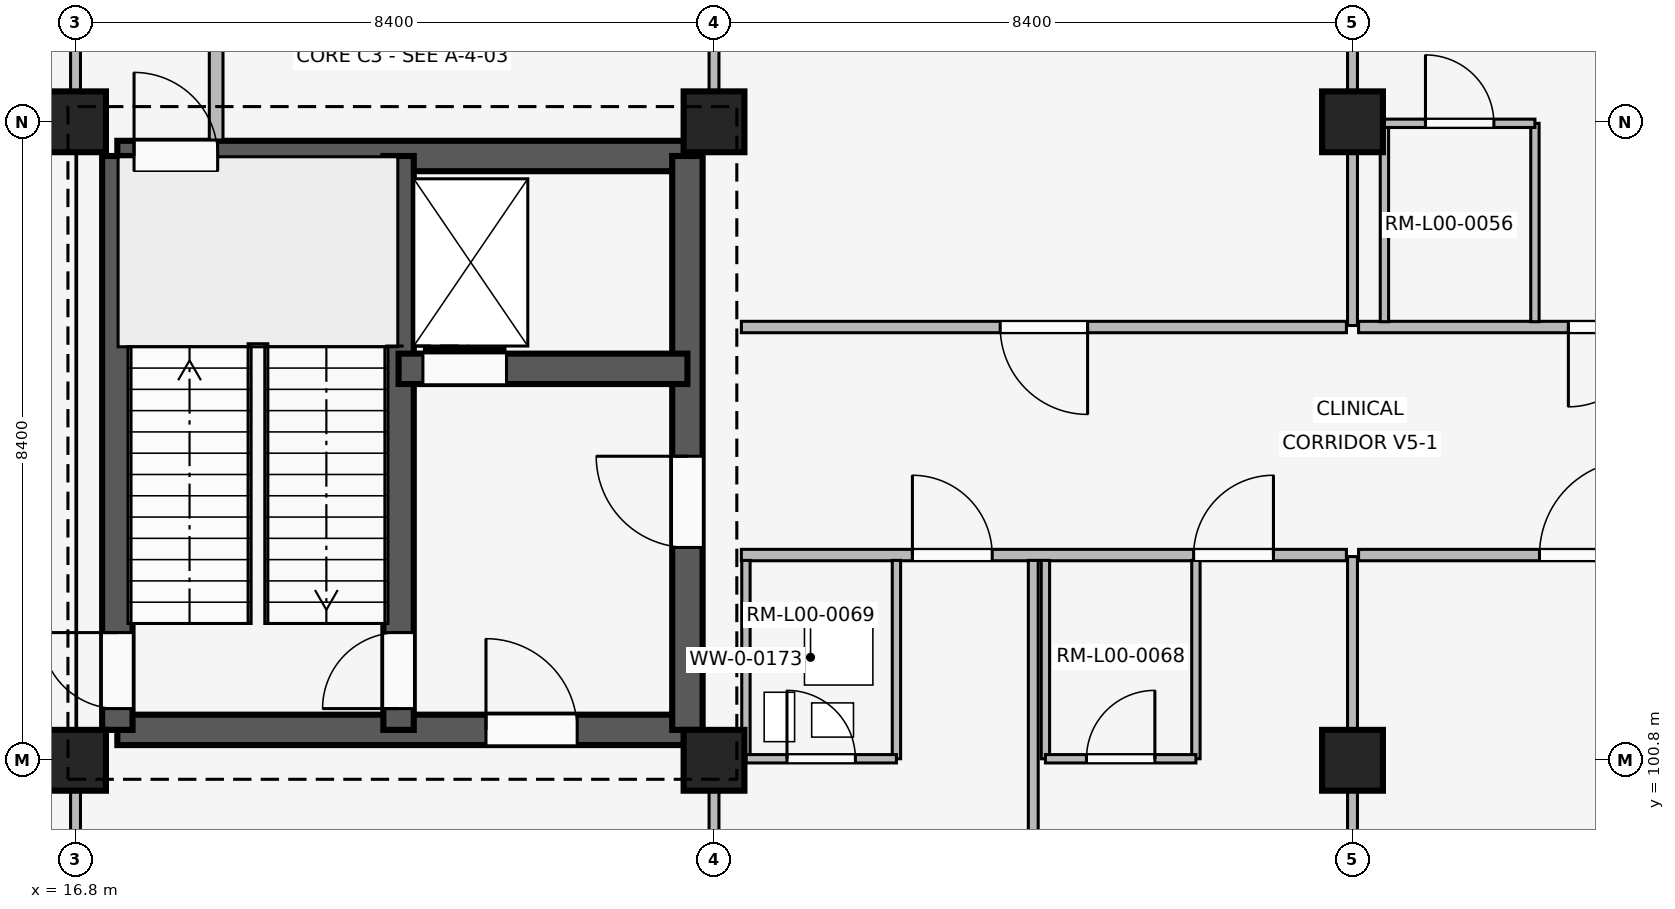
"""IFC4 building model, lengths in metres.
Left out: names, types, materials, properties, quantities, classifications, styles, units other than length and angle.
Written with IfcOpenShell. Run it as: python <this file> out.ifc"""

import sys

from ifc_helpers import new_model, si_unit, direction, frame, frame_2d, origin, origin_2d, place, context, subcontext, project, spatial, rectangle, extrude, element, fill, save


model = new_model("IFC4")
c1 = context("Model", 3, precision=1e-05, world=origin(), true_north=direction((0.0, 1.0)))
c2 = subcontext(c1, "Body", "Model", "MODEL_VIEW")
j1 = project(units=[si_unit("LENGTHUNIT", "METRE"), si_unit("PLANEANGLEUNIT", "RADIAN")], contexts=[c1])
p1 = place(None, origin())
s1 = spatial("IfcSite", under=j1, at=p1, CompositionType="ELEMENT")
p2 = place(p1, origin())
s2 = spatial("IfcBuilding", under=s1, at=p2, CompositionType="ELEMENT")
p3 = place(p2, origin())
s3 = spatial("IfcBuildingStorey", under=s2, at=p3, CompositionType="ELEMENT", Elevation=0.0)
for number, where, z_axis, x_axis in (
    (1, (16.8, 100.8, 0.0), (0.0, 0.0, 1.0), (1.0, 0.0, 0.0)),
    (2, (16.8, 109.2, 0.0), (0.0, 0.0, 1.0), (1.0, 0.0, 0.0)),
    (3, (25.2, 100.8, 0.0), (0.0, 0.0, 1.0), (1.0, 0.0, 0.0)),
    (4, (25.2, 109.2, 0.0), (0.0, 0.0, 1.0), (1.0, 0.0, 0.0)),
    (5, (33.6, 100.8, 0.0), (0.0, 0.0, 1.0), (1.0, 0.0, 0.0)),
    (6, (33.6, 109.2, 0.0), (0.0, 0.0, 1.0), (1.0, 0.0, 0.0)),
):
    element("IfcColumn", number, at=place(p3, frame(where, z_axis=z_axis, x_axis=x_axis)), inside=s3, PredefinedType="COLUMN", context=c2, shape_type="SweptSolid", body=[
        extrude(rectangle(XDim=0.8, YDim=0.8, at=origin_2d()), origin(), (0.0, 0.0, 1.0), 4.8),
    ])
p4 = place(p3, frame((17.35, 101.2, 0.0), z_axis=(0.0, 0.0, 1.0), x_axis=(1.0, 0.0, 0.0)))
e7 = element("IfcWall", 7, at=p4, inside=s3, PredefinedType="SHEAR", context=c2, shape_type="SweptSolid", body=[
    extrude(rectangle(XDim=7.5, YDim=0.4, at=frame_2d((3.75, 0.0))), origin(), (0.0, 0.0, 1.0), 4.52),
])
p5 = place(p4, frame((4.85, 0.0, 0.0)))
e8 = element("IfcOpeningElement", 8, at=p5, cuts=e7, PredefinedType="OPENING", context=c2, shape_type="SweptSolid", body=[
    extrude(rectangle(XDim=1.2, YDim=2.2, at=frame_2d((0.6, 1.1))), frame((0.0, 0.21, 0.0), z_axis=(0.0, -1.0, 0.0), x_axis=(1.0, 0.0, 0.0)), (0.0, 0.0, 1.0), 0.42),
])
p6 = place(p3, frame((17.35, 108.75, 0.0), z_axis=(0.0, 0.0, 1.0), x_axis=(1.0, 0.0, 0.0)))
e9 = element("IfcWall", 9, at=p6, inside=s3, PredefinedType="SHEAR", context=c2, shape_type="SweptSolid", body=[
    extrude(rectangle(XDim=7.5, YDim=0.4, at=frame_2d((3.75, 0.0))), origin(), (0.0, 0.0, 1.0), 4.52),
])
p7 = place(p6, frame((0.22, 0.0, 0.0)))
e10 = element("IfcOpeningElement", 10, at=p7, cuts=e9, PredefinedType="OPENING", context=c2, shape_type="SweptSolid", body=[
    extrude(rectangle(XDim=1.1, YDim=2.1, at=frame_2d((0.55, 1.05))), frame((0.0, 0.21, 0.0), z_axis=(0.0, -1.0, 0.0), x_axis=(1.0, 0.0, 0.0)), (0.0, 0.0, 1.0), 0.42),
])
p8 = place(p3, frame((17.35, 101.2, 0.0), z_axis=(0.0, 0.0, 1.0), x_axis=(0.0, 1.0, 0.0)))
e11 = element("IfcWall", 11, at=p8, inside=s3, PredefinedType="SHEAR", context=c2, shape_type="SweptSolid", body=[
    extrude(rectangle(XDim=7.55, YDim=0.4, at=frame_2d((3.775, 0.0))), origin(), (0.0, 0.0, 1.0), 4.52),
])
p9 = place(p8, frame((0.28, 0.0, 0.0)))
e12 = element("IfcOpeningElement", 12, at=p9, cuts=e11, PredefinedType="OPENING", context=c2, shape_type="SweptSolid", body=[
    extrude(rectangle(XDim=1.0, YDim=2.15, at=frame_2d((0.5, 1.075))), frame((0.0, 0.21, 0.0), z_axis=(0.0, -1.0, 0.0), x_axis=(1.0, 0.0, 0.0)), (0.0, 0.0, 1.0), 0.42),
])
p10 = place(p3, frame((24.85, 101.2, 0.0), z_axis=(0.0, 0.0, 1.0), x_axis=(0.0, 1.0, 0.0)))
e13 = element("IfcWall", 13, at=p10, inside=s3, PredefinedType="SHEAR", context=c2, shape_type="SweptSolid", body=[
    extrude(rectangle(XDim=7.55, YDim=0.4, at=frame_2d((3.775, 0.0))), origin(), (0.0, 0.0, 1.0), 4.52),
])
p11 = place(p10, frame((2.4, 0.0, 0.0)))
e14 = element("IfcOpeningElement", 14, at=p11, cuts=e13, PredefinedType="OPENING", context=c2, shape_type="SweptSolid", body=[
    extrude(rectangle(XDim=1.2, YDim=2.2, at=frame_2d((0.6, 1.1))), frame((0.0, 0.21, 0.0), z_axis=(0.0, -1.0, 0.0), x_axis=(1.0, 0.0, 0.0)), (0.0, 0.0, 1.0), 0.42),
])
p12 = place(p3, frame((21.05, 101.2, 0.0), z_axis=(0.0, 0.0, 1.0), x_axis=(0.0, 1.0, 0.0)))
e15 = element("IfcWall", 15, at=p12, inside=s3, PredefinedType="SHEAR", context=c2, shape_type="SweptSolid", body=[
    extrude(rectangle(XDim=7.55, YDim=0.4, at=frame_2d((3.775, 0.0))), origin(), (0.0, 0.0, 1.0), 4.52),
])
p13 = place(p12, frame((0.28, 0.0, 0.0)))
e16 = element("IfcOpeningElement", 16, at=p13, cuts=e15, PredefinedType="OPENING", context=c2, shape_type="SweptSolid", body=[
    extrude(rectangle(XDim=1.0, YDim=2.15, at=frame_2d((0.5, 1.075))), frame((0.0, 0.21, 0.0), z_axis=(0.0, -1.0, 0.0), x_axis=(1.0, 0.0, 0.0)), (0.0, 0.0, 1.0), 0.42),
])
p14 = place(p3, frame((21.05, 105.95, 0.0), z_axis=(0.0, 0.0, 1.0), x_axis=(1.0, 0.0, 0.0)))
e17 = element("IfcWall", 17, at=p14, inside=s3, PredefinedType="SHEAR", context=c2, shape_type="SweptSolid", body=[
    extrude(rectangle(XDim=3.8, YDim=0.4, at=frame_2d((1.9, 0.0))), origin(), (0.0, 0.0, 1.0), 4.52),
])
p15 = place(p14, frame((0.32, 0.0, 0.0)))
e18 = element("IfcOpeningElement", 18, at=p15, cuts=e17, PredefinedType="OPENING", context=c2, shape_type="SweptSolid", body=[
    extrude(rectangle(XDim=1.1, YDim=2.15, at=frame_2d((0.55, 1.075))), frame((0.0, 0.21, 0.0), z_axis=(0.0, -1.0, 0.0), x_axis=(1.0, 0.0, 0.0)), (0.0, 0.0, 1.0), 0.42),
])
p16 = place(p3, frame((16.8, 92.54, 0.0), z_axis=(0.0, 0.0, 1.0), x_axis=(0.0, 1.0, 0.0)))
e19 = element("IfcWall", 19, at=p16, inside=s3, PredefinedType="PARTITIONING", context=c2, shape_type="SweptSolid", body=[
    extrude(rectangle(XDim=8.21, YDim=0.13, at=frame_2d((4.105, 0.0))), origin(), (0.0, 0.0, 1.0), 3.8),
])
p17 = place(p3, frame((16.8, 109.55, 0.0), z_axis=(0.0, 0.0, 1.0), x_axis=(0.0, 1.0, 0.0)))
e20 = element("IfcWall", 20, at=p17, inside=s3, PredefinedType="PARTITIONING", context=c2, shape_type="SweptSolid", body=[
    extrude(rectangle(XDim=7.91, YDim=0.13, at=frame_2d((3.955, 0.0))), origin(), (0.0, 0.0, 1.0), 3.8),
])
p18 = place(p3, frame((18.65, 108.96, 0.0), z_axis=(0.0, 0.0, 1.0), x_axis=(0.0, 1.0, 0.0)))
e21 = element("IfcWall", 21, at=p18, inside=s3, PredefinedType="PARTITIONING", context=c2, shape_type="SweptSolid", body=[
    extrude(rectangle(XDim=8.5, YDim=0.18, at=frame_2d((4.25, 0.0))), origin(), (0.0, 0.0, 1.0), 3.8),
])
p19 = place(p3, frame((25.2, 92.54, 0.0), z_axis=(0.0, 0.0, 1.0), x_axis=(0.0, 1.0, 0.0)))
e22 = element("IfcWall", 22, at=p19, inside=s3, PredefinedType="PARTITIONING", context=c2, shape_type="SweptSolid", body=[
    extrude(rectangle(XDim=8.21, YDim=0.13, at=frame_2d((4.105, 0.0))), origin(), (0.0, 0.0, 1.0), 3.8),
])
p20 = place(p19, frame((3.64, 0.0, 0.0)))
e23 = element("IfcOpeningElement", 23, at=p20, cuts=e22, PredefinedType="OPENING", context=c2, shape_type="SweptSolid", body=[
    extrude(rectangle(XDim=1.08, YDim=2.15, at=frame_2d((0.54, 1.075))), frame((0.0, 0.075, 0.0), z_axis=(0.0, -1.0, 0.0), x_axis=(1.0, 0.0, 0.0)), (0.0, 0.0, 1.0), 0.15),
])
p21 = place(p3, frame((25.2, 109.55, 0.0), z_axis=(0.0, 0.0, 1.0), x_axis=(0.0, 1.0, 0.0)))
e24 = element("IfcWall", 24, at=p21, inside=s3, PredefinedType="PARTITIONING", context=c2, shape_type="SweptSolid", body=[
    extrude(rectangle(XDim=7.91, YDim=0.13, at=frame_2d((3.955, 0.0))), origin(), (0.0, 0.0, 1.0), 3.8),
])
p22 = place(p21, frame((3.4, 0.0, 0.0)))
e25 = element("IfcOpeningElement", 25, at=p22, cuts=e24, PredefinedType="OPENING", context=c2, shape_type="SweptSolid", body=[
    extrude(rectangle(XDim=1.05, YDim=2.2, at=frame_2d((0.525, 1.1))), frame((0.0, 0.075, 0.0), z_axis=(0.0, -1.0, 0.0), x_axis=(1.0, 0.0, 0.0)), (0.0, 0.0, 1.0), 0.15),
])
p23 = place(p3, frame((25.56, 103.5, 0.0), z_axis=(0.0, 0.0, 1.0), x_axis=(1.0, 0.0, 0.0)))
e26 = element("IfcWall", 26, at=p23, inside=s3, PredefinedType="PARTITIONING", context=c2, shape_type="SweptSolid", body=[
    extrude(rectangle(XDim=7.96, YDim=0.15, at=frame_2d((3.98, 0.0))), origin(), (0.0, 0.0, 1.0), 3.8),
])
p24 = place(p23, frame((2.25, 0.0, 0.0)))
e27 = element("IfcOpeningElement", 27, at=p24, cuts=e26, PredefinedType="OPENING", context=c2, shape_type="SweptSolid", body=[
    extrude(rectangle(XDim=1.05, YDim=2.2, at=frame_2d((0.525, 1.1))), frame((0.0, 0.085, 0.0), z_axis=(0.0, -1.0, 0.0), x_axis=(1.0, 0.0, 0.0)), (0.0, 0.0, 1.0), 0.17),
])
p25 = place(p23, frame((5.95, 0.0, 0.0)))
e28 = element("IfcOpeningElement", 28, at=p25, cuts=e26, PredefinedType="OPENING", context=c2, shape_type="SweptSolid", body=[
    extrude(rectangle(XDim=1.05, YDim=2.2, at=frame_2d((0.525, 1.1))), frame((0.0, 0.085, 0.0), z_axis=(0.0, -1.0, 0.0), x_axis=(1.0, 0.0, 0.0)), (0.0, 0.0, 1.0), 0.17),
])
p26 = place(p3, frame((29.4, 92.5, 0.0), z_axis=(0.0, 0.0, 1.0), x_axis=(0.0, 1.0, 0.0)))
e29 = element("IfcWall", 29, at=p26, inside=s3, PredefinedType="PARTITIONING", context=c2, shape_type="SweptSolid", body=[
    extrude(rectangle(XDim=10.93, YDim=0.13, at=frame_2d((5.465, 0.0))), origin(), (0.0, 0.0, 1.0), 3.8),
])
for number, where, z_axis, x_axis in (
    (30, (25.62, 100.82, 0.0), (0.0, 0.0, 1.0), (0.0, 1.0, 0.0)),
    (31, (27.6, 100.82, 0.0), (0.0, 0.0, 1.0), (0.0, 1.0, 0.0)),
):
    element("IfcWall", number, at=place(p3, frame(where, z_axis=z_axis, x_axis=x_axis)), inside=s3, PredefinedType="PARTITIONING", context=c2, shape_type="SweptSolid", body=[
        extrude(rectangle(XDim=2.61, YDim=0.11, at=frame_2d((1.305, 0.0))), origin(), (0.0, 0.0, 1.0), 3.8),
    ])
p27 = place(p3, frame((25.62, 100.82, 0.0), z_axis=(0.0, 0.0, 1.0), x_axis=(1.0, 0.0, 0.0)))
e32 = element("IfcWall", 32, at=p27, inside=s3, PredefinedType="PARTITIONING", context=c2, shape_type="SweptSolid", body=[
    extrude(rectangle(XDim=1.98, YDim=0.11, at=frame_2d((0.99, 0.0))), origin(), (0.0, 0.0, 1.0), 3.8),
])
p28 = place(p27, frame((0.54, 0.0, 0.0)))
e33 = element("IfcOpeningElement", 33, at=p28, cuts=e32, PredefinedType="OPENING", context=c2, shape_type="SweptSolid", body=[
    extrude(rectangle(XDim=0.9, YDim=2.1, at=frame_2d((0.45, 1.05))), frame((0.0, 0.065, 0.0), z_axis=(0.0, -1.0, 0.0), x_axis=(1.0, 0.0, 0.0)), (0.0, 0.0, 1.0), 0.13),
])
for number, where, z_axis, x_axis in (
    (34, (29.56, 100.82, 0.0), (0.0, 0.0, 1.0), (0.0, 1.0, 0.0)),
    (35, (31.54, 100.82, 0.0), (0.0, 0.0, 1.0), (0.0, 1.0, 0.0)),
):
    element("IfcWall", number, at=place(p3, frame(where, z_axis=z_axis, x_axis=x_axis)), inside=s3, PredefinedType="PARTITIONING", context=c2, shape_type="SweptSolid", body=[
        extrude(rectangle(XDim=2.61, YDim=0.11, at=frame_2d((1.305, 0.0))), origin(), (0.0, 0.0, 1.0), 3.8),
    ])
p29 = place(p3, frame((29.56, 100.82, 0.0), z_axis=(0.0, 0.0, 1.0), x_axis=(1.0, 0.0, 0.0)))
e36 = element("IfcWall", 36, at=p29, inside=s3, PredefinedType="PARTITIONING", context=c2, shape_type="SweptSolid", body=[
    extrude(rectangle(XDim=1.98, YDim=0.11, at=frame_2d((0.99, 0.0))), origin(), (0.0, 0.0, 1.0), 3.8),
])
p30 = place(p29, frame((0.54, 0.0, 0.0)))
e37 = element("IfcOpeningElement", 37, at=p30, cuts=e36, PredefinedType="OPENING", context=c2, shape_type="SweptSolid", body=[
    extrude(rectangle(XDim=0.9, YDim=2.1, at=frame_2d((0.45, 1.05))), frame((0.0, 0.065, 0.0), z_axis=(0.0, -1.0, 0.0), x_axis=(1.0, 0.0, 0.0)), (0.0, 0.0, 1.0), 0.13),
])
p31 = place(p3, frame((33.52, 106.5, 0.0), z_axis=(0.0, 0.0, 1.0), x_axis=(-1.0, 0.0, 0.0)))
e38 = element("IfcWall", 38, at=p31, inside=s3, PredefinedType="PARTITIONING", context=c2, shape_type="SweptSolid", body=[
    extrude(rectangle(XDim=7.96, YDim=0.15, at=frame_2d((3.98, 0.0))), origin(), (0.0, 0.0, 1.0), 3.8),
])
p32 = place(p31, frame((3.405, 0.0, 0.0)))
e39 = element("IfcOpeningElement", 39, at=p32, cuts=e38, PredefinedType="OPENING", context=c2, shape_type="SweptSolid", body=[
    extrude(rectangle(XDim=1.15, YDim=2.2, at=frame_2d((0.575, 1.1))), frame((0.0, 0.085, 0.0), z_axis=(0.0, -1.0, 0.0), x_axis=(1.0, 0.0, 0.0)), (0.0, 0.0, 1.0), 0.17),
])
for number, where, z_axis, x_axis in (
    (40, (33.6, 92.54, 0.0), (0.0, 0.0, 1.0), (0.0, 1.0, 0.0)),
    (41, (33.6, 106.52, 0.0), (0.0, 0.0, 1.0), (0.0, 1.0, 0.0)),
):
    element("IfcWall", number, at=place(p3, frame(where, z_axis=z_axis, x_axis=x_axis)), inside=s3, PredefinedType="PARTITIONING", context=c2, shape_type="SweptSolid", body=[
        extrude(rectangle(XDim=10.94, YDim=0.13, at=frame_2d((5.47, 0.0))), origin(), (0.0, 0.0, 1.0), 3.8),
    ])
p33 = place(p3, frame((33.68, 103.5, 0.0), z_axis=(0.0, 0.0, 1.0), x_axis=(1.0, 0.0, 0.0)))
e42 = element("IfcWall", 42, at=p33, inside=s3, PredefinedType="PARTITIONING", context=c2, shape_type="SweptSolid", body=[
    extrude(rectangle(XDim=5.78, YDim=0.15, at=frame_2d((2.89, 0.0))), origin(), (0.0, 0.0, 1.0), 3.8),
])
p34 = place(p33, frame((2.38, 0.0, 0.0)))
e43 = element("IfcOpeningElement", 43, at=p34, cuts=e42, PredefinedType="OPENING", context=c2, shape_type="SweptSolid", body=[
    extrude(rectangle(XDim=1.25, YDim=2.2, at=frame_2d((0.625, 1.1))), frame((0.0, 0.085, 0.0), z_axis=(0.0, -1.0, 0.0), x_axis=(1.0, 0.0, 0.0)), (0.0, 0.0, 1.0), 0.17),
])
p35 = place(p3, frame((41.64, 106.5, 0.0), z_axis=(0.0, 0.0, 1.0), x_axis=(-1.0, 0.0, 0.0)))
e44 = element("IfcWall", 44, at=p35, inside=s3, PredefinedType="PARTITIONING", context=c2, shape_type="SweptSolid", body=[
    extrude(rectangle(XDim=7.96, YDim=0.15, at=frame_2d((3.98, 0.0))), origin(), (0.0, 0.0, 1.0), 3.8),
])
p36 = place(p35, frame((0.45, 0.0, 0.0)))
e45 = element("IfcOpeningElement", 45, at=p36, cuts=e44, PredefinedType="OPENING", context=c2, shape_type="SweptSolid", body=[
    extrude(rectangle(XDim=1.05, YDim=2.2, at=frame_2d((0.525, 1.1))), frame((0.0, 0.085, 0.0), z_axis=(0.0, -1.0, 0.0), x_axis=(1.0, 0.0, 0.0)), (0.0, 0.0, 1.0), 0.17),
])
p37 = place(p35, frame((4.15, 0.0, 0.0)))
e46 = element("IfcOpeningElement", 46, at=p37, cuts=e44, PredefinedType="OPENING", context=c2, shape_type="SweptSolid", body=[
    extrude(rectangle(XDim=1.05, YDim=2.2, at=frame_2d((0.525, 1.1))), frame((0.0, 0.085, 0.0), z_axis=(0.0, -1.0, 0.0), x_axis=(1.0, 0.0, 0.0)), (0.0, 0.0, 1.0), 0.17),
])
for number, where, z_axis, x_axis in (
    (47, (34.02, 106.57, 0.0), (0.0, 0.0, 1.0), (0.0, 1.0, 0.0)),
    (48, (36.0, 106.57, 0.0), (0.0, 0.0, 1.0), (0.0, 1.0, 0.0)),
):
    element("IfcWall", number, at=place(p3, frame(where, z_axis=z_axis, x_axis=x_axis)), inside=s3, PredefinedType="PARTITIONING", context=c2, shape_type="SweptSolid", body=[
        extrude(rectangle(XDim=2.61, YDim=0.11, at=frame_2d((1.305, 0.0))), origin(), (0.0, 0.0, 1.0), 3.8),
    ])
p38 = place(p3, frame((34.02, 109.18, 0.0), z_axis=(0.0, 0.0, 1.0), x_axis=(1.0, 0.0, 0.0)))
e49 = element("IfcWall", 49, at=p38, inside=s3, PredefinedType="PARTITIONING", context=c2, shape_type="SweptSolid", body=[
    extrude(rectangle(XDim=1.98, YDim=0.11, at=frame_2d((0.99, 0.0))), origin(), (0.0, 0.0, 1.0), 3.8),
])
p39 = place(p38, frame((0.54, 0.0, 0.0)))
e50 = element("IfcOpeningElement", 50, at=p39, cuts=e49, PredefinedType="OPENING", context=c2, shape_type="SweptSolid", body=[
    extrude(rectangle(XDim=0.9, YDim=2.1, at=frame_2d((0.45, 1.05))), frame((0.0, 0.065, 0.0), z_axis=(0.0, -1.0, 0.0), x_axis=(1.0, 0.0, 0.0)), (0.0, 0.0, 1.0), 0.13),
])
p40 = place(p11, origin())
e51 = element("IfcDoor", 51, at=p40, inside=s3, OperationType="SINGLE_SWING_RIGHT", PredefinedType="DOOR", context=c2, shape_type="SweptSolid", body=[
    extrude(rectangle(XDim=1.2, YDim=2.2, at=frame_2d((0.6, 1.1))), frame((0.0, 0.025, 0.0), z_axis=(0.0, -1.0, 0.0), x_axis=(1.0, 0.0, 0.0)), (0.0, 0.0, 1.0), 0.05),
])
fill(e14, e51)
p41 = place(p5, origin())
e52 = element("IfcDoor", 52, at=p41, inside=s3, OperationType="SINGLE_SWING_LEFT", PredefinedType="DOOR", context=c2, shape_type="SweptSolid", body=[
    extrude(rectangle(XDim=1.2, YDim=2.2, at=frame_2d((0.6, 1.1))), frame((0.0, 0.025, 0.0), z_axis=(0.0, -1.0, 0.0), x_axis=(1.0, 0.0, 0.0)), (0.0, 0.0, 1.0), 0.05),
])
fill(e8, e52)
p42 = place(p9, origin())
e53 = element("IfcDoor", 53, at=p42, inside=s3, OperationType="SINGLE_SWING_RIGHT", PredefinedType="DOOR", context=c2, shape_type="SweptSolid", body=[
    extrude(rectangle(XDim=1.0, YDim=2.15, at=frame_2d((0.5, 1.075))), frame((0.0, 0.025, 0.0), z_axis=(0.0, -1.0, 0.0), x_axis=(1.0, 0.0, 0.0)), (0.0, 0.0, 1.0), 0.05),
])
fill(e12, e53)
p43 = place(p13, origin())
e54 = element("IfcDoor", 54, at=p43, inside=s3, OperationType="SINGLE_SWING_LEFT", PredefinedType="DOOR", context=c2, shape_type="SweptSolid", body=[
    extrude(rectangle(XDim=1.0, YDim=2.15, at=frame_2d((0.5, 1.075))), frame((0.0, 0.025, 0.0), z_axis=(0.0, -1.0, 0.0), x_axis=(1.0, 0.0, 0.0)), (0.0, 0.0, 1.0), 0.05),
])
fill(e16, e54)
p44 = place(p7, origin())
e55 = element("IfcDoor", 55, at=p44, inside=s3, OperationType="SINGLE_SWING_LEFT", PredefinedType="DOOR", context=c2, shape_type="SweptSolid", body=[
    extrude(rectangle(XDim=1.1, YDim=2.1, at=frame_2d((0.55, 1.05))), frame((0.0, 0.025, 0.0), z_axis=(0.0, -1.0, 0.0), x_axis=(1.0, 0.0, 0.0)), (0.0, 0.0, 1.0), 0.05),
])
fill(e10, e55)
p45 = place(p15, origin())
e56 = element("IfcDoor", 56, at=p45, inside=s3, OperationType="SLIDING_TO_LEFT", PredefinedType="DOOR", context=c2, shape_type="SweptSolid", body=[
    extrude(rectangle(XDim=1.1, YDim=2.15, at=frame_2d((0.55, 1.075))), frame((0.0, 0.025, 0.0), z_axis=(0.0, -1.0, 0.0), x_axis=(1.0, 0.0, 0.0)), (0.0, 0.0, 1.0), 0.05),
])
fill(e18, e56)
p46 = place(p24, origin())
e57 = element("IfcDoor", 57, at=p46, inside=s3, OperationType="SINGLE_SWING_LEFT", PredefinedType="DOOR", context=c2, shape_type="SweptSolid", body=[
    extrude(rectangle(XDim=1.05, YDim=2.2, at=frame_2d((0.525, 1.1))), frame((0.0, 0.025, 0.0), z_axis=(0.0, -1.0, 0.0), x_axis=(1.0, 0.0, 0.0)), (0.0, 0.0, 1.0), 0.05),
])
fill(e27, e57)
p47 = place(p25, origin())
e58 = element("IfcDoor", 58, at=p47, inside=s3, OperationType="SINGLE_SWING_RIGHT", PredefinedType="DOOR", context=c2, shape_type="SweptSolid", body=[
    extrude(rectangle(XDim=1.05, YDim=2.2, at=frame_2d((0.525, 1.1))), frame((0.0, 0.025, 0.0), z_axis=(0.0, -1.0, 0.0), x_axis=(1.0, 0.0, 0.0)), (0.0, 0.0, 1.0), 0.05),
])
fill(e28, e58)
p48 = place(p28, origin())
e59 = element("IfcDoor", 59, at=p48, inside=s3, OperationType="SINGLE_SWING_LEFT", PredefinedType="DOOR", context=c2, shape_type="SweptSolid", body=[
    extrude(rectangle(XDim=0.9, YDim=2.1, at=frame_2d((0.45, 1.05))), frame((0.0, 0.025, 0.0), z_axis=(0.0, -1.0, 0.0), x_axis=(1.0, 0.0, 0.0)), (0.0, 0.0, 1.0), 0.05),
])
fill(e33, e59)
p49 = place(p30, origin())
e60 = element("IfcDoor", 60, at=p49, inside=s3, OperationType="SINGLE_SWING_RIGHT", PredefinedType="DOOR", context=c2, shape_type="SweptSolid", body=[
    extrude(rectangle(XDim=0.9, YDim=2.1, at=frame_2d((0.45, 1.05))), frame((0.0, 0.025, 0.0), z_axis=(0.0, -1.0, 0.0), x_axis=(1.0, 0.0, 0.0)), (0.0, 0.0, 1.0), 0.05),
])
fill(e37, e60)
p50 = place(p32, origin())
e61 = element("IfcDoor", 61, at=p50, inside=s3, OperationType="SINGLE_SWING_LEFT", PredefinedType="DOOR", context=c2, shape_type="SweptSolid", body=[
    extrude(rectangle(XDim=1.15, YDim=2.2, at=frame_2d((0.575, 1.1))), frame((0.0, 0.025, 0.0), z_axis=(0.0, -1.0, 0.0), x_axis=(1.0, 0.0, 0.0)), (0.0, 0.0, 1.0), 0.05),
])
fill(e39, e61)
p51 = place(p34, origin())
e62 = element("IfcDoor", 62, at=p51, inside=s3, OperationType="SINGLE_SWING_RIGHT", PredefinedType="DOOR", context=c2, shape_type="SweptSolid", body=[
    extrude(rectangle(XDim=1.25, YDim=2.2, at=frame_2d((0.625, 1.1))), frame((0.0, 0.025, 0.0), z_axis=(0.0, -1.0, 0.0), x_axis=(1.0, 0.0, 0.0)), (0.0, 0.0, 1.0), 0.05),
])
fill(e43, e62)
p52 = place(p37, origin())
e63 = element("IfcDoor", 63, at=p52, inside=s3, OperationType="SINGLE_SWING_RIGHT", PredefinedType="DOOR", context=c2, shape_type="SweptSolid", body=[
    extrude(rectangle(XDim=1.05, YDim=2.2, at=frame_2d((0.525, 1.1))), frame((0.0, 0.025, 0.0), z_axis=(0.0, -1.0, 0.0), x_axis=(1.0, 0.0, 0.0)), (0.0, 0.0, 1.0), 0.05),
])
fill(e46, e63)
p53 = place(p39, origin())
e64 = element("IfcDoor", 64, at=p53, inside=s3, OperationType="SINGLE_SWING_LEFT", PredefinedType="DOOR", context=c2, shape_type="SweptSolid", body=[
    extrude(rectangle(XDim=0.9, YDim=2.1, at=frame_2d((0.45, 1.05))), frame((0.0, 0.025, 0.0), z_axis=(0.0, -1.0, 0.0), x_axis=(1.0, 0.0, 0.0)), (0.0, 0.0, 1.0), 0.05),
])
fill(e50, e64)
save(model, sys.argv[1])
